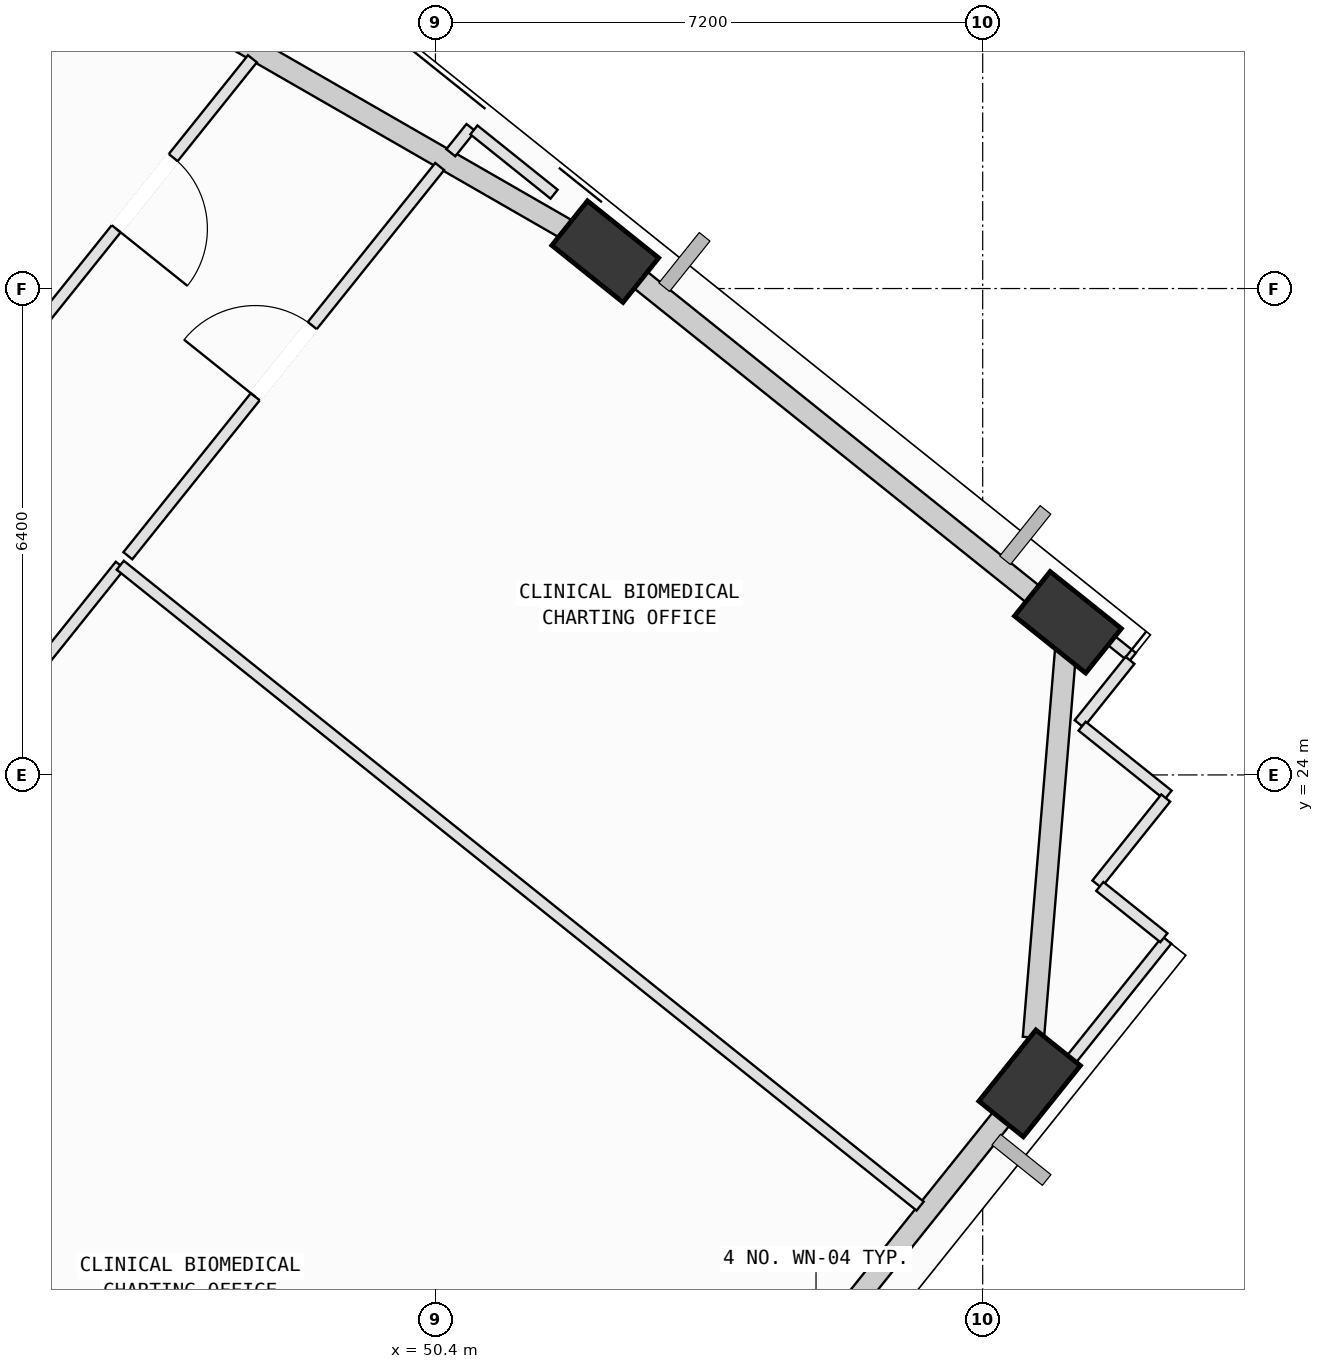
"""IFC4 building model, lengths in metres.
Left out: names, types, materials, properties, quantities, classifications, styles, units other than length and angle.
Written with IfcOpenShell. Run it as: python <this file> out.ifc"""

import sys

from ifc_helpers import new_model, si_unit, direction, frame, frame_2d, origin, origin_2d, place, context, subcontext, project, spatial, rectangle, extrude, element, fill, save


model = new_model("IFC4")
c1 = context("Model", 3, precision=1e-05, world=origin(), true_north=direction((0.0, 1.0)))
c2 = subcontext(c1, "Body", "Model", "MODEL_VIEW")
j1 = project(units=[si_unit("LENGTHUNIT", "METRE"), si_unit("PLANEANGLEUNIT", "RADIAN")], contexts=[c1])
p1 = place(None, origin())
s1 = spatial("IfcSite", under=j1, at=p1, CompositionType="ELEMENT")
p2 = place(p1, origin())
s2 = spatial("IfcBuilding", under=s1, at=p2, CompositionType="ELEMENT")
p3 = place(p2, frame((0.0, 0.0, 243.2)))
s3 = spatial("IfcBuildingStorey", under=s2, at=p3, CompositionType="ELEMENT", Elevation=243.2)
p4 = place(p3, frame((58.218, 19.941, 0.002), z_axis=(0.019140338397, 0.10171722691, 0.994629203872), x_axis=(-0.758005842311, -0.647226631841, 0.080776420186)))
e1 = element("IfcColumn", 1, at=p4, inside=s3, PredefinedType="COLUMN", context=c2, shape_type="SweptSolid", body=[
    extrude(rectangle(XDim=1.2, YDim=0.75, at=origin_2d()), origin(), (0.0, 0.0, 1.0), 4.018),
])
p5 = place(p3, frame((58.721, 26.009, 0.002), z_axis=(-0.005833123973, 0.103537950515, 0.994608399054), x_axis=(0.81417436665, -0.576988739135, 0.064838997537)))
e2 = element("IfcColumn", 2, at=p5, inside=s3, PredefinedType="COLUMN", context=c2, shape_type="SweptSolid", body=[
    extrude(rectangle(XDim=1.2, YDim=0.75, at=origin_2d()), origin(), (0.0, 0.0, 1.0), 4.018),
])
p6 = place(p3, frame((52.634, 30.885, 0.002), z_axis=(-0.025814199525, 0.078416719311, 0.996586396273), x_axis=(0.936134083823, -0.347834131917, 0.05161776611)))
e3 = element("IfcColumn", 3, at=p6, inside=s3, PredefinedType="COLUMN", context=c2, shape_type="SweptSolid", body=[
    extrude(rectangle(XDim=1.2, YDim=0.75, at=origin_2d()), origin(), (0.0, 0.0, 1.0), 4.01),
])
p7 = place(p3, frame((58.091, 19.784, 0.0), z_axis=(0.0, 0.0, 1.0), x_axis=(-0.625260807623, -0.780415865069, 0.0)))
e4 = element("IfcWall", 4, at=p7, inside=s3, PredefinedType="SOLIDWALL", context=c2, shape_type="SweptSolid", body=[
    extrude(rectangle(XDim=6.418, YDim=0.28, at=frame_2d((3.209, 0.0))), origin(), (0.0, 0.0, 1.0), 3.265),
])
p8 = place(p7, frame((3.393, 0.0, 0.75)))
e5 = element("IfcOpeningElement", 5, at=p8, cuts=e4, PredefinedType="OPENING", context=c2, shape_type="SweptSolid", body=[
    extrude(rectangle(XDim=1.8, YDim=2.05, at=frame_2d((0.9, 1.025))), frame((0.0, 0.15, 0.0), z_axis=(0.0, -1.0, 0.0), x_axis=(1.0, 0.0, 0.0)), (0.0, 0.0, 1.0), 0.3),
])
p9 = place(p3, frame((58.706, 25.819, 0.0), z_axis=(0.0, 0.0, 1.0), x_axis=(-0.082824121578, -0.996564180013, 0.0)))
e6 = element("IfcWall", 6, at=p9, inside=s3, PredefinedType="SOLIDWALL", context=c2, shape_type="SweptSolid", body=[
    extrude(rectangle(XDim=5.294, YDim=0.28, at=frame_2d((2.647, 0.0))), origin(), (0.0, 0.0, 1.0), 3.265),
])
p10 = place(p3, frame((52.828, 30.73, 0.0), z_axis=(0.0, 0.0, 1.0), x_axis=(0.780415642575, -0.625261085327, 0.0)))
e7 = element("IfcWall", 7, at=p10, inside=s3, PredefinedType="SOLIDWALL", context=c2, shape_type="SweptSolid", body=[
    extrude(rectangle(XDim=7.046, YDim=0.28, at=frame_2d((3.523, 0.0))), origin(), (0.0, 0.0, 1.0), 3.265),
])
p11 = place(p3, frame((44.363, 35.643, 0.0), z_axis=(0.0, 0.0, 1.0), x_axis=(0.86682135291, -0.498618834521, 0.0)))
e8 = element("IfcWall", 8, at=p11, inside=s3, PredefinedType="SOLIDWALL", context=c2, shape_type="SweptSolid", body=[
    extrude(rectangle(XDim=9.036, YDim=0.28, at=frame_2d((4.518, 0.0))), origin(), (0.0, 0.0, 1.0), 3.265),
])
p12 = place(p3, frame((41.23, 20.489, 0.0), z_axis=(0.0, 0.0, 1.0), x_axis=(0.625221152435, 0.780447634725, 0.0)))
e9 = element("IfcWall", 9, at=p12, inside=s3, PredefinedType="PARTITIONING", context=c2, shape_type="SweptSolid", body=[
    extrude(rectangle(XDim=8.034, YDim=0.15, at=frame_2d((4.017, 0.0))), origin(), (0.0, 0.0, 1.0), 3.78),
])
p13 = place(p12, frame((3.417, 0.0, 0.0)))
e10 = element("IfcOpeningElement", 10, at=p13, cuts=e9, PredefinedType="OPENING", context=c2, shape_type="SweptSolid", body=[
    extrude(rectangle(XDim=1.2, YDim=2.15, at=frame_2d((0.6, 1.075))), frame((0.0, 0.085, 0.0), z_axis=(0.0, -1.0, 0.0), x_axis=(1.0, 0.0, 0.0)), (0.0, 0.0, 1.0), 0.17),
])
p14 = place(p3, frame((46.253, 26.759, 0.0), z_axis=(0.0, 0.0, 1.0), x_axis=(0.780405841244, -0.6252733186, 0.0)))
e11 = element("IfcWall", 11, at=p14, inside=s3, PredefinedType="PARTITIONING", context=c2, shape_type="SweptSolid", body=[
    extrude(rectangle(XDim=13.486, YDim=0.15, at=frame_2d((6.743, 0.0))), origin(), (0.0, 0.0, 1.0), 3.78),
])
p15 = place(p3, frame((60.023, 21.827, 0.0), z_axis=(0.0, 0.0, 1.0), x_axis=(-0.625204910984, -0.780460645568, 0.0)))
e12 = element("IfcWall", 12, at=p15, inside=s3, PredefinedType="PARTITIONING", context=c2, shape_type="SweptSolid", body=[
    extrude(rectangle(XDim=2.802, YDim=0.15, at=frame_2d((1.401, 0.0))), origin(), (0.0, 0.0, 1.0), 3.265),
])
p16 = place(p3, frame((46.353, 26.884, 0.0), z_axis=(0.0, 0.0, 1.0), x_axis=(0.625284721196, 0.780396705169, 0.0)))
e13 = element("IfcWall", 13, at=p16, inside=s3, PredefinedType="PARTITIONING", context=c2, shape_type="SweptSolid", body=[
    extrude(rectangle(XDim=6.562, YDim=0.15, at=frame_2d((3.281, 0.0))), origin(), (0.0, 0.0, 1.0), 3.78),
])
p17 = place(p16, frame((2.681, 0.0, 0.0)))
e14 = element("IfcOpeningElement", 14, at=p17, cuts=e13, PredefinedType="OPENING", context=c2, shape_type="SweptSolid", body=[
    extrude(rectangle(XDim=1.2, YDim=2.15, at=frame_2d((0.6, 1.075))), frame((0.0, 0.085, 0.0), z_axis=(0.0, -1.0, 0.0), x_axis=(1.0, 0.0, 0.0)), (0.0, 0.0, 1.0), 0.17),
])
p18 = place(p3, frame((50.602, 32.187, 0.0), z_axis=(0.0, 0.0, 1.0), x_axis=(0.624765267043, 0.780812628674, 0.0)))
e15 = element("IfcWall", 15, at=p18, inside=s3, PredefinedType="PARTITIONING", context=c2, shape_type="SweptSolid", body=[
    extrude(rectangle(XDim=0.424, YDim=0.15, at=frame_2d((0.212, 0.0))), origin(), (0.0, 0.0, 1.0), 3.78),
])
p19 = place(p3, frame((50.906, 32.487, 0.0), z_axis=(0.0, 0.0, 1.0), x_axis=(0.780146097306, -0.625597368008, 0.0)))
e16 = element("IfcWall", 16, at=p19, inside=s3, PredefinedType="PARTITIONING", context=c2, shape_type="SweptSolid", body=[
    extrude(rectangle(XDim=1.352, YDim=0.15, at=frame_2d((0.676, 0.0))), origin(), (0.0, 0.0, 1.0), 3.265),
])
p20 = place(p3, frame((52.321, 31.354, 0.0), z_axis=(0.0, 0.0, 1.0), x_axis=(0.779928536571, -0.62586857873, 0.0)))
e17 = element("IfcWall", 17, at=p20, inside=s3, PredefinedType="PARTITIONING", context=c2, shape_type="SweptSolid", body=[
    extrude(rectangle(XDim=0.786, YDim=0.15, at=frame_2d((0.393, 0.0))), origin(), (0.0, 0.0, 1.0), 3.265),
])
p21 = place(p3, frame((58.433, 26.457, 0.0), z_axis=(0.0, 0.0, 1.0), x_axis=(0.780492276446, -0.625165423235, 0.0)))
e18 = element("IfcWall", 18, at=p21, inside=s3, PredefinedType="PARTITIONING", context=c2, shape_type="SweptSolid", body=[
    extrude(rectangle(XDim=1.456, YDim=0.15, at=frame_2d((0.728, 0.0))), origin(), (0.0, 0.0, 1.0), 3.265),
])
p22 = place(p3, frame((59.538, 25.508, 0.0), z_axis=(0.0, 0.0, 1.0), x_axis=(-0.62539041373, -0.780312008375, 0.0)))
e19 = element("IfcWall", 19, at=p22, inside=s3, PredefinedType="PARTITIONING", context=c2, shape_type="SweptSolid", body=[
    extrude(rectangle(XDim=1.07, YDim=0.15, at=frame_2d((0.535, 0.0))), origin(), (0.0, 0.0, 1.0), 3.78),
])
for number, where, z_axis, x_axis in (
    (20, (58.908, 24.642, 0.0), (0.0, 0.0, 1.0), (0.78, -0.626, 0.0)),
    (21, (60.008, 23.696, 0.0), (0.0, 0.0, 1.0), (-0.625, -0.781, 0.0)),
):
    element("IfcWall", number, at=place(p3, frame(where, z_axis=z_axis, x_axis=x_axis)), inside=s3, PredefinedType="PARTITIONING", context=c2, shape_type="SweptSolid", body=[
        extrude(rectangle(XDim=1.45, YDim=0.15, at=frame_2d((0.725, 0.0))), origin(), (0.0, 0.0, 1.0), 3.78),
    ])
p23 = place(p3, frame((59.141, 22.533, 0.0), z_axis=(0.0, 0.0, 1.0), x_axis=(0.780493675326, -0.625163676789, 0.0)))
e22 = element("IfcWall", 22, at=p23, inside=s3, PredefinedType="PARTITIONING", context=c2, shape_type="SweptSolid", body=[
    extrude(rectangle(XDim=1.08, YDim=0.15, at=frame_2d((0.54, 0.0))), origin(), (0.0, 0.0, 1.0), 3.78),
])
p24 = place(p3, frame((47.992, 33.423, 0.0), z_axis=(0.0, 0.0, 1.0), x_axis=(-0.625272947214, -0.780406138804, 0.0)))
e23 = element("IfcWall", 23, at=p24, inside=s3, PredefinedType="PARTITIONING", context=c2, shape_type="SweptSolid", body=[
    extrude(rectangle(XDim=4.532, YDim=0.15, at=frame_2d((2.266, 0.0))), origin(), (0.0, 0.0, 1.0), 3.78),
])
p25 = place(p24, frame((1.666, 0.0, 0.0)))
e24 = element("IfcOpeningElement", 24, at=p25, cuts=e23, PredefinedType="OPENING", context=c2, shape_type="SweptSolid", body=[
    extrude(rectangle(XDim=1.2, YDim=2.15, at=frame_2d((0.6, 1.075))), frame((0.0, 0.085, 0.0), z_axis=(0.0, -1.0, 0.0), x_axis=(1.0, 0.0, 0.0)), (0.0, 0.0, 1.0), 0.17),
])
p26 = place(p17, origin())
e25 = element("IfcDoor", 25, at=p26, inside=s3, OperationType="SINGLE_SWING_LEFT", PredefinedType="DOOR", context=c2, shape_type="SweptSolid", body=[
    extrude(rectangle(XDim=1.2, YDim=2.15, at=frame_2d((0.6, 1.075))), frame((0.0, 0.025, 0.0), z_axis=(0.0, -1.0, 0.0), x_axis=(1.0, 0.0, 0.0)), (0.0, 0.0, 1.0), 0.05),
])
fill(e14, e25)
p27 = place(p25, origin())
e26 = element("IfcDoor", 26, at=p27, inside=s3, OperationType="SINGLE_SWING_RIGHT", PredefinedType="DOOR", context=c2, shape_type="SweptSolid", body=[
    extrude(rectangle(XDim=1.2, YDim=2.15, at=frame_2d((0.6, 1.075))), frame((0.0, 0.025, 0.0), z_axis=(0.0, -1.0, 0.0), x_axis=(1.0, 0.0, 0.0)), (0.0, 0.0, 1.0), 0.05),
])
fill(e24, e26)
save(model, sys.argv[1])
